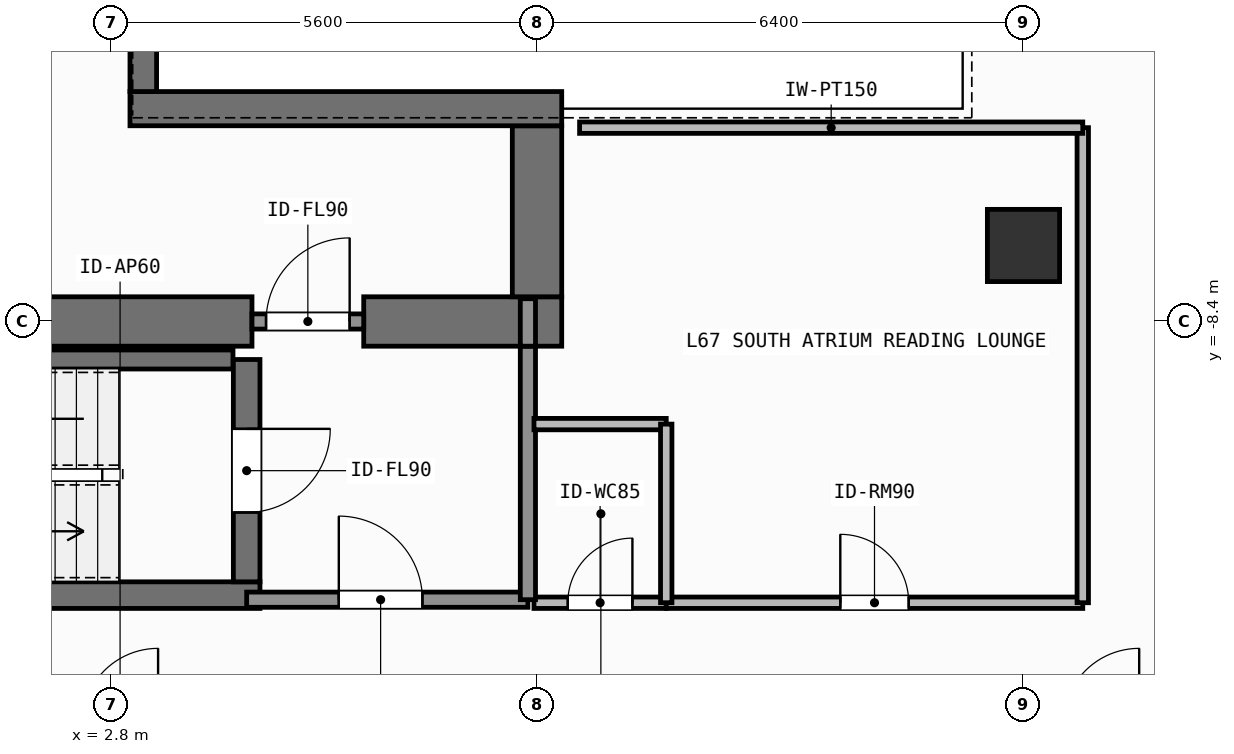
"""IFC4 building model, lengths in metres.
Left out: names, types, materials, properties, quantities, classifications, styles, units other than length and angle.
Written with IfcOpenShell. Run it as: python <this file> out.ifc"""

import sys

from ifc_helpers import new_model, si_unit, direction, frame, frame_2d, origin, origin_2d, place, context, subcontext, project, spatial, rectangle, extrude, element, fill, save


model = new_model("IFC4")
c1 = context("Model", 3, precision=1e-05, world=origin(), true_north=direction((0.0, 1.0)))
c2 = subcontext(c1, "Body", "Model", "MODEL_VIEW")
j1 = project(units=[si_unit("LENGTHUNIT", "METRE"), si_unit("PLANEANGLEUNIT", "RADIAN")], contexts=[c1])
p1 = place(None, origin())
s1 = spatial("IfcSite", under=j1, at=p1, CompositionType="ELEMENT")
p2 = place(p1, origin())
s2 = spatial("IfcBuilding", under=s1, at=p2, CompositionType="ELEMENT")
p3 = place(p2, frame((0.0, 0.0, 274.2)))
s3 = spatial("IfcBuildingStorey", under=s2, at=p3, CompositionType="ELEMENT", Elevation=274.2)
p4 = place(p3, frame((-2.62, -8.4, 0.0), z_axis=(0.0, 0.0, 1.0), x_axis=(1.0, 0.0, 0.0)))
e1 = element("IfcWall", 1, at=p4, inside=s3, PredefinedType="SHEAR", context=c2, shape_type="SweptSolid", body=[
    extrude(rectangle(XDim=7.27, YDim=0.65, at=frame_2d((3.635, 0.0))), origin(), (0.0, 0.0, 1.0), 3.9),
])
p5 = place(p3, frame((6.12, -8.4, 0.0), z_axis=(0.0, 0.0, 1.0), x_axis=(1.0, 0.0, 0.0)))
e2 = element("IfcWall", 2, at=p5, inside=s3, PredefinedType="SHEAR", context=c2, shape_type="SweptSolid", body=[
    extrude(rectangle(XDim=2.605, YDim=0.65, at=frame_2d((1.302, 0.0))), origin(), (0.0, 0.0, 1.0), 3.9),
])
p6 = place(p3, frame((8.4, -8.075, 0.0), z_axis=(0.0, 0.0, 1.0), x_axis=(0.0, 1.0, 0.0)))
e3 = element("IfcWall", 3, at=p6, inside=s3, PredefinedType="SHEAR", context=c2, shape_type="SweptSolid", body=[
    extrude(rectangle(XDim=2.25, YDim=0.65, at=frame_2d((1.125, 0.0))), origin(), (0.0, 0.0, 1.0), 3.9),
])
p7 = place(p3, frame((3.045, -5.6, 0.0), z_axis=(0.0, 0.0, 1.0), x_axis=(1.0, 0.0, 0.0)))
e4 = element("IfcWall", 4, at=p7, inside=s3, PredefinedType="SHEAR", context=c2, shape_type="SweptSolid", body=[
    extrude(rectangle(XDim=5.68, YDim=0.45, at=frame_2d((2.84, 0.0))), origin(), (0.0, 0.0, 1.0), 3.9),
])
p8 = place(p3, frame((3.22, -5.375, 0.0), z_axis=(0.0, 0.0, 1.0), x_axis=(0.0, 1.0, 0.0)))
e5 = element("IfcWall", 5, at=p8, inside=s3, PredefinedType="SHEAR", context=c2, shape_type="SweptSolid", body=[
    extrude(rectangle(XDim=10.75, YDim=0.35, at=frame_2d((5.375, 0.0))), origin(), (0.0, 0.0, 1.0), 3.9),
])
p9 = place(p3, frame((-2.555, -12.0, 0.0), z_axis=(0.0, 0.0, 1.0), x_axis=(1.0, 0.0, 0.0)))
e6 = element("IfcWall", 6, at=p9, inside=s3, PredefinedType="SHEAR", context=c2, shape_type="SweptSolid", body=[
    extrude(rectangle(XDim=7.31, YDim=0.35, at=frame_2d((3.655, 0.0))), origin(), (0.0, 0.0, 1.0), 3.9),
])
p10 = place(p3, frame((-2.2, -8.9, 0.0), z_axis=(0.0, 0.0, 1.0), x_axis=(1.0, 0.0, 0.0)))
e7 = element("IfcWall", 7, at=p10, inside=s3, PredefinedType="SHEAR", context=c2, shape_type="SweptSolid", body=[
    extrude(rectangle(XDim=6.6, YDim=0.25, at=frame_2d((3.3, 0.0))), origin(), (0.0, 0.0, 1.0), 3.9),
])
p11 = place(p3, frame((4.58, -8.9, 0.0), z_axis=(0.0, 0.0, 1.0), x_axis=(0.0, -1.0, 0.0)))
e8 = element("IfcWall", 8, at=p11, inside=s3, PredefinedType="SHEAR", context=c2, shape_type="SweptSolid", body=[
    extrude(rectangle(XDim=2.925, YDim=0.35, at=frame_2d((1.462, 0.0))), origin(), (0.0, 0.0, 1.0), 3.9),
])
p12 = place(p11, frame((0.913, 0.0, 0.0)))
e9 = element("IfcOpeningElement", 9, at=p12, cuts=e8, PredefinedType="OPENING", context=c2, shape_type="SweptSolid", body=[
    extrude(rectangle(XDim=1.1, YDim=2.15, at=frame_2d((0.55, 1.075))), frame((0.0, 0.185, 0.0), z_axis=(0.0, -1.0, 0.0), x_axis=(1.0, 0.0, 0.0)), (0.0, 0.0, 1.0), 0.37),
])
p13 = place(p3, frame((14.8, -7.4, 0.0), z_axis=(0.0, 0.0, 1.0), x_axis=(1.0, 0.0, 0.0)))
e10 = element("IfcColumn", 10, at=p13, inside=s3, PredefinedType="COLUMN", context=c2, shape_type="SweptSolid", body=[
    extrude(rectangle(XDim=0.95, YDim=0.95, at=origin_2d()), origin(), (0.0, 0.0, 1.0), 3.9),
])
p14 = place(p3, frame((4.58, -12.06, 0.0), z_axis=(0.0, 0.0, 1.0), x_axis=(1.0, 0.0, 0.0)))
e11 = element("IfcWall", 11, at=p14, inside=s3, PredefinedType="SOLIDWALL", context=c2, shape_type="SweptSolid", body=[
    extrude(rectangle(XDim=3.7, YDim=0.2, at=frame_2d((1.85, 0.0))), origin(), (0.0, 0.0, 1.0), 3.68),
])
p15 = place(p14, frame((1.212, 0.0, 0.0)))
e12 = element("IfcOpeningElement", 12, at=p15, cuts=e11, PredefinedType="OPENING", context=c2, shape_type="SweptSolid", body=[
    extrude(rectangle(XDim=1.1, YDim=2.15, at=frame_2d((0.55, 1.075))), frame((0.0, 0.11, 0.0), z_axis=(0.0, -1.0, 0.0), x_axis=(1.0, 0.0, 0.0)), (0.0, 0.0, 1.0), 0.22),
])
p16 = place(p3, frame((4.65, -8.4, 0.0), z_axis=(0.0, 0.0, 1.0), x_axis=(1.0, 0.0, 0.0)))
e13 = element("IfcWall", 13, at=p16, inside=s3, PredefinedType="SOLIDWALL", context=c2, shape_type="SweptSolid", body=[
    extrude(rectangle(XDim=1.47, YDim=0.2, at=frame_2d((0.735, 0.0))), origin(), (0.0, 0.0, 1.0), 2.92),
])
p17 = place(p16, frame((0.185, 0.0, 0.0)))
e14 = element("IfcOpeningElement", 14, at=p17, cuts=e13, PredefinedType="OPENING", context=c2, shape_type="SweptSolid", body=[
    extrude(rectangle(XDim=1.1, YDim=2.15, at=frame_2d((0.55, 1.075))), frame((0.0, 0.11, 0.0), z_axis=(0.0, -1.0, 0.0), x_axis=(1.0, 0.0, 0.0)), (0.0, 0.0, 1.0), 0.22),
])
p18 = place(p3, frame((8.36, -12.1, 0.0), z_axis=(0.0, 0.0, 1.0), x_axis=(1.0, 0.0, 0.0)))
e15 = element("IfcWall", 15, at=p18, inside=s3, PredefinedType="PARTITIONING", context=c2, shape_type="SweptSolid", body=[
    extrude(rectangle(XDim=1.74, YDim=0.15, at=frame_2d((0.87, 0.0))), origin(), (0.0, 0.0, 1.0), 3.68),
])
p19 = place(p18, frame((0.445, 0.0, 0.0)))
e16 = element("IfcOpeningElement", 16, at=p19, cuts=e15, PredefinedType="OPENING", context=c2, shape_type="SweptSolid", body=[
    extrude(rectangle(XDim=0.85, YDim=2.1, at=frame_2d((0.425, 1.05))), frame((0.0, 0.085, 0.0), z_axis=(0.0, -1.0, 0.0), x_axis=(1.0, 0.0, 0.0)), (0.0, 0.0, 1.0), 0.17),
])
p20 = place(p3, frame((10.1, -12.1, 0.0), z_axis=(0.0, 0.0, 1.0), x_axis=(1.0, 0.0, 0.0)))
e17 = element("IfcWall", 17, at=p20, inside=s3, PredefinedType="PARTITIONING", context=c2, shape_type="SweptSolid", body=[
    extrude(rectangle(XDim=5.48, YDim=0.15, at=frame_2d((2.74, 0.0))), origin(), (0.0, 0.0, 1.0), 3.68),
])
p21 = place(p20, frame((2.29, 0.0, 0.0)))
e18 = element("IfcOpeningElement", 18, at=p21, cuts=e17, PredefinedType="OPENING", context=c2, shape_type="SweptSolid", body=[
    extrude(rectangle(XDim=0.9, YDim=2.1, at=frame_2d((0.45, 1.05))), frame((0.0, 0.085, 0.0), z_axis=(0.0, -1.0, 0.0), x_axis=(1.0, 0.0, 0.0)), (0.0, 0.0, 1.0), 0.17),
])
p22 = place(p3, frame((8.28, -12.06, 0.0), z_axis=(0.0, 0.0, 1.0), x_axis=(0.0, 1.0, 0.0)))
e19 = element("IfcWall", 19, at=p22, inside=s3, PredefinedType="SOLIDWALL", context=c2, shape_type="SweptSolid", body=[
    extrude(rectangle(XDim=3.335, YDim=0.2, at=frame_2d((1.667, 0.0))), origin(), (0.0, 0.0, 1.0), 3.68),
])
p23 = place(p3, frame((8.28, -8.725, 0.0), z_axis=(0.0, 0.0, 1.0), x_axis=(0.0, 1.0, 0.0)))
e20 = element("IfcWall", 20, at=p23, inside=s3, PredefinedType="SOLIDWALL", context=c2, shape_type="SweptSolid", body=[
    extrude(rectangle(XDim=0.625, YDim=0.2, at=frame_2d((0.312, 0.0))), origin(), (0.0, 0.0, 1.0), 3.68),
])
p24 = place(p3, frame((8.36, -9.75, 0.0), z_axis=(0.0, 0.0, 1.0), x_axis=(1.0, 0.0, 0.0)))
e21 = element("IfcWall", 21, at=p24, inside=s3, PredefinedType="PARTITIONING", context=c2, shape_type="SweptSolid", body=[
    extrude(rectangle(XDim=1.74, YDim=0.15, at=frame_2d((0.87, 0.0))), origin(), (0.0, 0.0, 1.0), 3.68),
])
p25 = place(p3, frame((10.1, -12.1, 0.0), z_axis=(0.0, 0.0, 1.0), x_axis=(0.0, 1.0, 0.0)))
e22 = element("IfcWall", 22, at=p25, inside=s3, PredefinedType="PARTITIONING", context=c2, shape_type="SweptSolid", body=[
    extrude(rectangle(XDim=2.35, YDim=0.15, at=frame_2d((1.175, 0.0))), origin(), (0.0, 0.0, 1.0), 3.68),
])
p26 = place(p3, frame((15.58, -12.1, 0.0), z_axis=(0.0, 0.0, 1.0), x_axis=(0.0, 1.0, 0.0)))
e23 = element("IfcWall", 23, at=p26, inside=s3, PredefinedType="PARTITIONING", context=c2, shape_type="SweptSolid", body=[
    extrude(rectangle(XDim=6.25, YDim=0.15, at=frame_2d((3.125, 0.0))), origin(), (0.0, 0.0, 1.0), 3.68),
])
p27 = place(p3, frame((8.96, -5.85, 0.0), z_axis=(0.0, 0.0, 1.0), x_axis=(1.0, 0.0, 0.0)))
e24 = element("IfcWall", 24, at=p27, inside=s3, PredefinedType="PARTITIONING", context=c2, shape_type="SweptSolid", body=[
    extrude(rectangle(XDim=6.62, YDim=0.15, at=frame_2d((3.31, 0.0))), origin(), (0.0, 0.0, 1.0), 3.68),
])
p28 = place(p12, origin())
e25 = element("IfcDoor", 25, at=p28, inside=s3, OperationType="SINGLE_SWING_LEFT", PredefinedType="DOOR", context=c2, shape_type="SweptSolid", body=[
    extrude(rectangle(XDim=1.1, YDim=2.15, at=frame_2d((0.55, 1.075))), frame((0.0, 0.025, 0.0), z_axis=(0.0, -1.0, 0.0), x_axis=(1.0, 0.0, 0.0)), (0.0, 0.0, 1.0), 0.05),
])
fill(e9, e25)
p29 = place(p15, origin())
e26 = element("IfcDoor", 26, at=p29, inside=s3, OperationType="SINGLE_SWING_LEFT", PredefinedType="DOOR", context=c2, shape_type="SweptSolid", body=[
    extrude(rectangle(XDim=1.1, YDim=2.15, at=frame_2d((0.55, 1.075))), frame((0.0, 0.025, 0.0), z_axis=(0.0, -1.0, 0.0), x_axis=(1.0, 0.0, 0.0)), (0.0, 0.0, 1.0), 0.05),
])
fill(e12, e26)
p30 = place(p17, origin())
e27 = element("IfcDoor", 27, at=p30, inside=s3, OperationType="SINGLE_SWING_RIGHT", PredefinedType="DOOR", context=c2, shape_type="SweptSolid", body=[
    extrude(rectangle(XDim=1.1, YDim=2.15, at=frame_2d((0.55, 1.075))), frame((0.0, 0.025, 0.0), z_axis=(0.0, -1.0, 0.0), x_axis=(1.0, 0.0, 0.0)), (0.0, 0.0, 1.0), 0.05),
])
fill(e14, e27)
p31 = place(p19, origin())
e28 = element("IfcDoor", 28, at=p31, inside=s3, OperationType="SINGLE_SWING_RIGHT", PredefinedType="DOOR", context=c2, shape_type="SweptSolid", body=[
    extrude(rectangle(XDim=0.85, YDim=2.1, at=frame_2d((0.425, 1.05))), frame((0.0, 0.025, 0.0), z_axis=(0.0, -1.0, 0.0), x_axis=(1.0, 0.0, 0.0)), (0.0, 0.0, 1.0), 0.05),
])
fill(e16, e28)
p32 = place(p21, origin())
e29 = element("IfcDoor", 29, at=p32, inside=s3, OperationType="SINGLE_SWING_LEFT", PredefinedType="DOOR", context=c2, shape_type="SweptSolid", body=[
    extrude(rectangle(XDim=0.9, YDim=2.1, at=frame_2d((0.45, 1.05))), frame((0.0, 0.025, 0.0), z_axis=(0.0, -1.0, 0.0), x_axis=(1.0, 0.0, 0.0)), (0.0, 0.0, 1.0), 0.05),
])
fill(e18, e29)
save(model, sys.argv[1])
